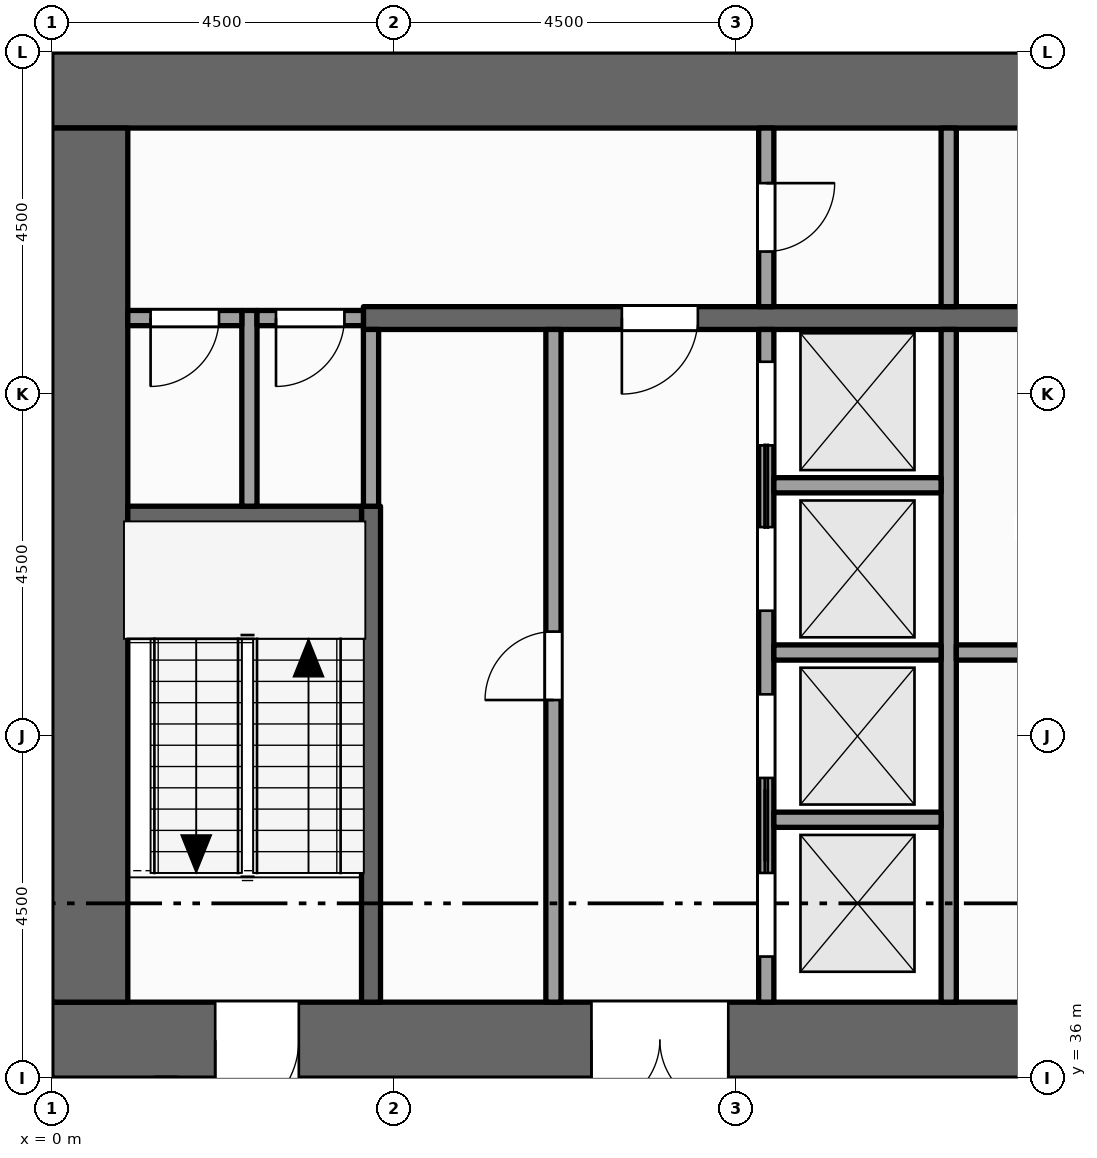
"""IFC4 building model, lengths in metres.
Left out: names, types, materials, properties, quantities, classifications, styles, units other than length and angle.
Written with IfcOpenShell. Run it as: python <this file> out.ifc"""

import sys

from ifc_helpers import new_model, si_unit, direction, frame, frame_2d, origin, place, context, subcontext, project, spatial, rectangle, extrude, element, fill, save


model = new_model("IFC4")
c1 = context("Model", 3, precision=1e-05, world=origin(), true_north=direction((0.0, 1.0)))
c2 = subcontext(c1, "Body", "Model", "MODEL_VIEW")
j1 = project(units=[si_unit("LENGTHUNIT", "METRE"), si_unit("PLANEANGLEUNIT", "RADIAN")], contexts=[c1])
p1 = place(None, origin())
s1 = spatial("IfcSite", under=j1, at=p1, CompositionType="ELEMENT")
p2 = place(p1, origin())
s2 = spatial("IfcBuilding", under=s1, at=p2, CompositionType="ELEMENT")
p3 = place(p2, frame((0.0, 0.0, 223.0)))
s3 = spatial("IfcBuildingStorey", under=s2, at=p3, CompositionType="ELEMENT", Elevation=223.0)
p4 = place(p3, frame((0.0, 36.5, -0.15), z_axis=(0.0, 0.0, 1.0), x_axis=(1.0, 0.0, 0.0)))
e1 = element("IfcWall", 1, at=p4, inside=s3, PredefinedType="SHEAR", context=c2, shape_type="SweptSolid", body=[
    extrude(rectangle(XDim=22.5, YDim=1.0, at=frame_2d((11.25, 0.0))), origin(), (0.0, 0.0, 1.0), 4.0),
])
p5 = place(p4, frame((7.1, 0.0, 0.15)))
e2 = element("IfcOpeningElement", 2, at=p5, cuts=e1, PredefinedType="OPENING", context=c2, shape_type="SweptSolid", body=[
    extrude(rectangle(XDim=1.8, YDim=2.1, at=frame_2d((0.9, 1.05))), frame((0.0, 0.51, 0.0), z_axis=(0.0, -1.0, 0.0), x_axis=(1.0, 0.0, 0.0)), (0.0, 0.0, 1.0), 1.02),
])
p6 = place(p4, frame((13.15, 0.0, 0.15)))
e3 = element("IfcOpeningElement", 3, at=p6, cuts=e1, PredefinedType="OPENING", context=c2, shape_type="SweptSolid", body=[
    extrude(rectangle(XDim=1.1, YDim=2.1, at=frame_2d((0.55, 1.05))), frame((0.0, 0.51, 0.0), z_axis=(0.0, -1.0, 0.0), x_axis=(1.0, 0.0, 0.0)), (0.0, 0.0, 1.0), 1.02),
])
p7 = place(p4, frame((2.15, 0.0, 0.15)))
e4 = element("IfcOpeningElement", 4, at=p7, cuts=e1, PredefinedType="OPENING", context=c2, shape_type="SweptSolid", body=[
    extrude(rectangle(XDim=1.1, YDim=2.1, at=frame_2d((0.55, 1.05))), frame((0.0, 0.51, 0.0), z_axis=(0.0, -1.0, 0.0), x_axis=(1.0, 0.0, 0.0)), (0.0, 0.0, 1.0), 1.02),
])
p8 = place(p4, frame((19.35, 0.0, 0.15)))
e5 = element("IfcOpeningElement", 5, at=p8, cuts=e1, PredefinedType="OPENING", context=c2, shape_type="SweptSolid", body=[
    extrude(rectangle(XDim=1.1, YDim=2.1, at=frame_2d((0.55, 1.05))), frame((0.0, 0.51, 0.0), z_axis=(0.0, -1.0, 0.0), x_axis=(1.0, 0.0, 0.0)), (0.0, 0.0, 1.0), 1.02),
])
p9 = place(p3, frame((0.0, 49.0, -0.15), z_axis=(0.0, 0.0, 1.0), x_axis=(1.0, 0.0, 0.0)))
e6 = element("IfcWall", 6, at=p9, inside=s3, PredefinedType="SHEAR", context=c2, shape_type="SweptSolid", body=[
    extrude(rectangle(XDim=22.5, YDim=1.0, at=frame_2d((11.25, 0.0))), origin(), (0.0, 0.0, 1.0), 4.0),
])
p10 = place(p3, frame((0.5, 37.0, -0.15), z_axis=(0.0, 0.0, 1.0), x_axis=(0.0, 1.0, 0.0)))
e7 = element("IfcWall", 7, at=p10, inside=s3, PredefinedType="SHEAR", context=c2, shape_type="SweptSolid", body=[
    extrude(rectangle(XDim=11.5, YDim=1.0, at=frame_2d((5.75, 0.0))), origin(), (0.0, 0.0, 1.0), 4.0),
])
p11 = place(p3, frame((2.6, 43.525, 0.0), z_axis=(0.0, 0.0, 1.0), x_axis=(0.0, 1.0, 0.0)))
e8 = element("IfcWall", 8, at=p11, inside=s3, PredefinedType="PARTITIONING", context=c2, shape_type="SweptSolid", body=[
    extrude(rectangle(XDim=2.575, YDim=0.2, at=frame_2d((1.288, 0.0))), origin(), (0.0, 0.0, 1.0), 3.85),
])
p12 = place(p3, frame((4.2, 37.0, 0.0), z_axis=(0.0, 0.0, 1.0), x_axis=(0.0, 1.0, 0.0)))
e9 = element("IfcWall", 9, at=p12, inside=s3, PredefinedType="SHEAR", context=c2, shape_type="SweptSolid", body=[
    extrude(rectangle(XDim=6.525, YDim=0.25, at=frame_2d((3.262, 0.0))), origin(), (0.0, 0.0, 1.0), 3.85),
])
p13 = place(p3, frame((4.2, 43.525, 0.0), z_axis=(0.0, 0.0, 1.0), x_axis=(0.0, 1.0, 0.0)))
e10 = element("IfcWall", 10, at=p13, inside=s3, PredefinedType="PARTITIONING", context=c2, shape_type="SweptSolid", body=[
    extrude(rectangle(XDim=2.325, YDim=0.2, at=frame_2d((1.163, 0.0))), origin(), (0.0, 0.0, 1.0), 3.85),
])
p14 = place(p3, frame((6.6, 37.0, 0.0), z_axis=(0.0, 0.0, 1.0), x_axis=(0.0, 1.0, 0.0)))
e11 = element("IfcWall", 11, at=p14, inside=s3, PredefinedType="PARTITIONING", context=c2, shape_type="SweptSolid", body=[
    extrude(rectangle(XDim=8.85, YDim=0.2, at=frame_2d((4.425, 0.0))), origin(), (0.0, 0.0, 1.0), 3.85),
])
p15 = place(p14, frame((3.975, 0.0, 0.0)))
e12 = element("IfcOpeningElement", 12, at=p15, cuts=e11, PredefinedType="OPENING", context=c2, shape_type="SweptSolid", body=[
    extrude(rectangle(XDim=0.9, YDim=2.1, at=frame_2d((0.45, 1.05))), frame((0.0, 0.11, 0.0), z_axis=(0.0, -1.0, 0.0), x_axis=(1.0, 0.0, 0.0)), (0.0, 0.0, 1.0), 0.22),
])
p16 = place(p3, frame((9.4, 37.0, 0.0), z_axis=(0.0, 0.0, 1.0), x_axis=(0.0, 1.0, 0.0)))
e13 = element("IfcWall", 13, at=p16, inside=s3, PredefinedType="SOLIDWALL", context=c2, shape_type="SweptSolid", body=[
    extrude(rectangle(XDim=8.85, YDim=0.2, at=frame_2d((4.425, 0.0))), origin(), (0.0, 0.0, 1.0), 3.85),
])
p17 = place(p16, frame((0.6, 0.0, 0.012)))
e14 = element("IfcOpeningElement", 14, at=p17, cuts=e13, PredefinedType="OPENING", context=c2, shape_type="SweptSolid", body=[
    extrude(rectangle(XDim=1.1, YDim=2.1, at=frame_2d((0.55, 1.05))), frame((0.0, 0.11, 0.0), z_axis=(0.0, -1.0, 0.0), x_axis=(1.0, 0.0, 0.0)), (0.0, 0.0, 1.0), 0.22),
])
p18 = place(p16, frame((2.95, 0.0, 0.012)))
e15 = element("IfcOpeningElement", 15, at=p18, cuts=e13, PredefinedType="OPENING", context=c2, shape_type="SweptSolid", body=[
    extrude(rectangle(XDim=1.1, YDim=2.1, at=frame_2d((0.55, 1.05))), frame((0.0, 0.11, 0.0), z_axis=(0.0, -1.0, 0.0), x_axis=(1.0, 0.0, 0.0)), (0.0, 0.0, 1.0), 0.22),
])
p19 = place(p16, frame((5.15, 0.0, 0.012)))
e16 = element("IfcOpeningElement", 16, at=p19, cuts=e13, PredefinedType="OPENING", context=c2, shape_type="SweptSolid", body=[
    extrude(rectangle(XDim=1.1, YDim=2.1, at=frame_2d((0.55, 1.05))), frame((0.0, 0.11, 0.0), z_axis=(0.0, -1.0, 0.0), x_axis=(1.0, 0.0, 0.0)), (0.0, 0.0, 1.0), 0.22),
])
p20 = place(p16, frame((7.325, 0.0, 0.012)))
e17 = element("IfcOpeningElement", 17, at=p20, cuts=e13, PredefinedType="OPENING", context=c2, shape_type="SweptSolid", body=[
    extrude(rectangle(XDim=1.1, YDim=2.1, at=frame_2d((0.55, 1.05))), frame((0.0, 0.11, 0.0), z_axis=(0.0, -1.0, 0.0), x_axis=(1.0, 0.0, 0.0)), (0.0, 0.0, 1.0), 0.22),
])
p21 = place(p3, frame((9.4, 46.15, 0.0), z_axis=(0.0, 0.0, 1.0), x_axis=(0.0, 1.0, 0.0)))
e18 = element("IfcWall", 18, at=p21, inside=s3, PredefinedType="PARTITIONING", context=c2, shape_type="SweptSolid", body=[
    extrude(rectangle(XDim=2.35, YDim=0.2, at=frame_2d((1.175, 0.0))), origin(), (0.0, 0.0, 1.0), 3.85),
])
p22 = place(p21, frame((0.725, 0.0, 0.0)))
e19 = element("IfcOpeningElement", 19, at=p22, cuts=e18, PredefinedType="OPENING", context=c2, shape_type="SweptSolid", body=[
    extrude(rectangle(XDim=0.9, YDim=2.1, at=frame_2d((0.45, 1.05))), frame((0.0, 0.11, 0.0), z_axis=(0.0, -1.0, 0.0), x_axis=(1.0, 0.0, 0.0)), (0.0, 0.0, 1.0), 0.22),
])
p23 = place(p3, frame((11.8, 37.0, 0.0), z_axis=(0.0, 0.0, 1.0), x_axis=(0.0, 1.0, 0.0)))
e20 = element("IfcWall", 20, at=p23, inside=s3, PredefinedType="SOLIDWALL", context=c2, shape_type="SweptSolid", body=[
    extrude(rectangle(XDim=8.85, YDim=0.2, at=frame_2d((4.425, 0.0))), origin(), (0.0, 0.0, 1.0), 3.85),
])
p24 = place(p3, frame((11.8, 46.15, 0.0), z_axis=(0.0, 0.0, 1.0), x_axis=(0.0, 1.0, 0.0)))
e21 = element("IfcWall", 21, at=p24, inside=s3, PredefinedType="PARTITIONING", context=c2, shape_type="SweptSolid", body=[
    extrude(rectangle(XDim=2.35, YDim=0.2, at=frame_2d((1.175, 0.0))), origin(), (0.0, 0.0, 1.0), 3.85),
])
for number, where, z_axis, x_axis in (
    (22, (9.5, 39.4, 0.0), (0.0, 0.0, 1.0), (1.0, 0.0, 0.0)),
    (23, (9.5, 41.6, 0.0), (0.0, 0.0, 1.0), (1.0, 0.0, 0.0)),
):
    element("IfcWall", number, at=place(p3, frame(where, z_axis=z_axis, x_axis=x_axis)), inside=s3, PredefinedType="SOLIDWALL", context=c2, shape_type="SweptSolid", body=[
        extrude(rectangle(XDim=2.2, YDim=0.2, at=frame_2d((1.1, 0.0))), origin(), (0.0, 0.0, 1.0), 3.85),
    ])
p25 = place(p3, frame((11.9, 41.6, 0.0), z_axis=(0.0, 0.0, 1.0), x_axis=(1.0, 0.0, 0.0)))
e24 = element("IfcWall", 24, at=p25, inside=s3, PredefinedType="PARTITIONING", context=c2, shape_type="SweptSolid", body=[
    extrude(rectangle(XDim=3.6, YDim=0.2, at=frame_2d((1.8, 0.0))), origin(), (0.0, 0.0, 1.0), 3.85),
])
p26 = place(p25, frame((1.3, 0.0, 0.0)))
e25 = element("IfcOpeningElement", 25, at=p26, cuts=e24, PredefinedType="OPENING", context=c2, shape_type="SweptSolid", body=[
    extrude(rectangle(XDim=1.0, YDim=2.1, at=frame_2d((0.5, 1.05))), frame((0.0, 0.11, 0.0), z_axis=(0.0, -1.0, 0.0), x_axis=(1.0, 0.0, 0.0)), (0.0, 0.0, 1.0), 0.22),
])
p27 = place(p3, frame((1.0, 43.4, 0.0), z_axis=(0.0, 0.0, 1.0), x_axis=(1.0, 0.0, 0.0)))
e26 = element("IfcWall", 26, at=p27, inside=s3, PredefinedType="SHEAR", context=c2, shape_type="SweptSolid", body=[
    extrude(rectangle(XDim=3.075, YDim=0.25, at=frame_2d((1.538, 0.0))), origin(), (0.0, 0.0, 1.0), 3.85),
])
p28 = place(p3, frame((9.5, 43.8, 0.0), z_axis=(0.0, 0.0, 1.0), x_axis=(1.0, 0.0, 0.0)))
e27 = element("IfcWall", 27, at=p28, inside=s3, PredefinedType="SOLIDWALL", context=c2, shape_type="SweptSolid", body=[
    extrude(rectangle(XDim=2.2, YDim=0.2, at=frame_2d((1.1, 0.0))), origin(), (0.0, 0.0, 1.0), 3.85),
])
p29 = place(p3, frame((1.0, 46.0, 0.0), z_axis=(0.0, 0.0, 1.0), x_axis=(1.0, 0.0, 0.0)))
e28 = element("IfcWall", 28, at=p29, inside=s3, PredefinedType="PARTITIONING", context=c2, shape_type="SweptSolid", body=[
    extrude(rectangle(XDim=1.5, YDim=0.2, at=frame_2d((0.75, 0.0))), origin(), (0.0, 0.0, 1.0), 3.85),
])
p30 = place(p29, frame((0.3, 0.0, 0.0)))
e29 = element("IfcOpeningElement", 29, at=p30, cuts=e28, PredefinedType="OPENING", context=c2, shape_type="SweptSolid", body=[
    extrude(rectangle(XDim=0.9, YDim=2.1, at=frame_2d((0.45, 1.05))), frame((0.0, 0.11, 0.0), z_axis=(0.0, -1.0, 0.0), x_axis=(1.0, 0.0, 0.0)), (0.0, 0.0, 1.0), 0.22),
])
p31 = place(p3, frame((2.7, 46.0, 0.0), z_axis=(0.0, 0.0, 1.0), x_axis=(1.0, 0.0, 0.0)))
e30 = element("IfcWall", 30, at=p31, inside=s3, PredefinedType="PARTITIONING", context=c2, shape_type="SweptSolid", body=[
    extrude(rectangle(XDim=1.4, YDim=0.2, at=frame_2d((0.7, 0.0))), origin(), (0.0, 0.0, 1.0), 3.85),
])
p32 = place(p31, frame((0.25, 0.0, 0.0)))
e31 = element("IfcOpeningElement", 31, at=p32, cuts=e30, PredefinedType="OPENING", context=c2, shape_type="SweptSolid", body=[
    extrude(rectangle(XDim=0.9, YDim=2.1, at=frame_2d((0.45, 1.05))), frame((0.0, 0.11, 0.0), z_axis=(0.0, -1.0, 0.0), x_axis=(1.0, 0.0, 0.0)), (0.0, 0.0, 1.0), 0.22),
])
p33 = place(p3, frame((4.1, 46.0, 0.0), z_axis=(0.0, 0.0, 1.0), x_axis=(1.0, 0.0, 0.0)))
e32 = element("IfcWall", 32, at=p33, inside=s3, PredefinedType="SHEAR", context=c2, shape_type="SweptSolid", body=[
    extrude(rectangle(XDim=14.5, YDim=0.3, at=frame_2d((7.25, 0.0))), origin(), (0.0, 0.0, 1.0), 3.85),
])
p34 = place(p33, frame((3.4, 0.0, 0.0)))
e33 = element("IfcOpeningElement", 33, at=p34, cuts=e32, PredefinedType="OPENING", context=c2, shape_type="SweptSolid", body=[
    extrude(rectangle(XDim=1.0, YDim=2.1, at=frame_2d((0.5, 1.05))), frame((0.0, 0.16, 0.0), z_axis=(0.0, -1.0, 0.0), x_axis=(1.0, 0.0, 0.0)), (0.0, 0.0, 1.0), 0.32),
])
p35 = place(p33, frame((9.1, 0.0, 0.0)))
e34 = element("IfcOpeningElement", 34, at=p35, cuts=e32, PredefinedType="OPENING", context=c2, shape_type="SweptSolid", body=[
    extrude(rectangle(XDim=1.0, YDim=2.1, at=frame_2d((0.5, 1.05))), frame((0.0, 0.16, 0.0), z_axis=(0.0, -1.0, 0.0), x_axis=(1.0, 0.0, 0.0)), (0.0, 0.0, 1.0), 0.32),
])
p36 = place(p17, origin())
e35 = element("IfcDoor", 35, at=p36, inside=s3, OperationType="SLIDING_TO_RIGHT", PredefinedType="DOOR", context=c2, shape_type="SweptSolid", body=[
    extrude(rectangle(XDim=1.1, YDim=2.1, at=frame_2d((0.55, 1.05))), frame((0.0, 0.025, 0.0), z_axis=(0.0, -1.0, 0.0), x_axis=(1.0, 0.0, 0.0)), (0.0, 0.0, 1.0), 0.05),
])
fill(e14, e35)
p37 = place(p18, origin())
e36 = element("IfcDoor", 36, at=p37, inside=s3, OperationType="SLIDING_TO_LEFT", PredefinedType="DOOR", context=c2, shape_type="SweptSolid", body=[
    extrude(rectangle(XDim=1.1, YDim=2.1, at=frame_2d((0.55, 1.05))), frame((0.0, 0.025, 0.0), z_axis=(0.0, -1.0, 0.0), x_axis=(1.0, 0.0, 0.0)), (0.0, 0.0, 1.0), 0.05),
])
fill(e15, e36)
p38 = place(p19, origin())
e37 = element("IfcDoor", 37, at=p38, inside=s3, OperationType="SLIDING_TO_RIGHT", PredefinedType="DOOR", context=c2, shape_type="SweptSolid", body=[
    extrude(rectangle(XDim=1.1, YDim=2.1, at=frame_2d((0.55, 1.05))), frame((0.0, 0.025, 0.0), z_axis=(0.0, -1.0, 0.0), x_axis=(1.0, 0.0, 0.0)), (0.0, 0.0, 1.0), 0.05),
])
fill(e16, e37)
p39 = place(p20, origin())
e38 = element("IfcDoor", 38, at=p39, inside=s3, OperationType="SLIDING_TO_LEFT", PredefinedType="DOOR", context=c2, shape_type="SweptSolid", body=[
    extrude(rectangle(XDim=1.1, YDim=2.1, at=frame_2d((0.55, 1.05))), frame((0.0, 0.025, 0.0), z_axis=(0.0, -1.0, 0.0), x_axis=(1.0, 0.0, 0.0)), (0.0, 0.0, 1.0), 0.05),
])
fill(e17, e38)
p40 = place(p5, origin())
e39 = element("IfcDoor", 39, at=p40, inside=s3, OperationType="DOUBLE_DOOR_SINGLE_SWING", PredefinedType="DOOR", context=c2, shape_type="SweptSolid", body=[
    extrude(rectangle(XDim=1.8, YDim=2.1, at=frame_2d((0.9, 1.05))), frame((0.0, 0.025, 0.0), z_axis=(0.0, -1.0, 0.0), x_axis=(1.0, 0.0, 0.0)), (0.0, 0.0, 1.0), 0.05),
])
fill(e2, e39)
p41 = place(p34, origin())
e40 = element("IfcDoor", 40, at=p41, inside=s3, OperationType="SINGLE_SWING_LEFT", PredefinedType="DOOR", context=c2, shape_type="SweptSolid", body=[
    extrude(rectangle(XDim=1.0, YDim=2.1, at=frame_2d((0.5, 1.05))), frame((0.0, 0.025, 0.0), z_axis=(0.0, -1.0, 0.0), x_axis=(1.0, 0.0, 0.0)), (0.0, 0.0, 1.0), 0.05),
])
fill(e33, e40)
p42 = place(p22, origin())
e41 = element("IfcDoor", 41, at=p42, inside=s3, OperationType="SINGLE_SWING_RIGHT", PredefinedType="DOOR", context=c2, shape_type="SweptSolid", body=[
    extrude(rectangle(XDim=0.9, YDim=2.1, at=frame_2d((0.45, 1.05))), frame((0.0, 0.025, 0.0), z_axis=(0.0, -1.0, 0.0), x_axis=(1.0, 0.0, 0.0)), (0.0, 0.0, 1.0), 0.05),
])
fill(e19, e41)
p43 = place(p7, origin())
e42 = element("IfcDoor", 42, at=p43, inside=s3, OperationType="SINGLE_SWING_LEFT", PredefinedType="DOOR", context=c2, shape_type="SweptSolid", body=[
    extrude(rectangle(XDim=1.1, YDim=2.1, at=frame_2d((0.55, 1.05))), frame((0.0, 0.025, 0.0), z_axis=(0.0, -1.0, 0.0), x_axis=(1.0, 0.0, 0.0)), (0.0, 0.0, 1.0), 0.05),
])
fill(e4, e42)
p44 = place(p30, origin())
e43 = element("IfcDoor", 43, at=p44, inside=s3, OperationType="SINGLE_SWING_LEFT", PredefinedType="DOOR", context=c2, shape_type="SweptSolid", body=[
    extrude(rectangle(XDim=0.9, YDim=2.1, at=frame_2d((0.45, 1.05))), frame((0.0, 0.025, 0.0), z_axis=(0.0, -1.0, 0.0), x_axis=(1.0, 0.0, 0.0)), (0.0, 0.0, 1.0), 0.05),
])
fill(e29, e43)
p45 = place(p32, origin())
e44 = element("IfcDoor", 44, at=p45, inside=s3, OperationType="SINGLE_SWING_LEFT", PredefinedType="DOOR", context=c2, shape_type="SweptSolid", body=[
    extrude(rectangle(XDim=0.9, YDim=2.1, at=frame_2d((0.45, 1.05))), frame((0.0, 0.025, 0.0), z_axis=(0.0, -1.0, 0.0), x_axis=(1.0, 0.0, 0.0)), (0.0, 0.0, 1.0), 0.05),
])
fill(e31, e44)
p46 = place(p15, origin())
e45 = element("IfcDoor", 45, at=p46, inside=s3, OperationType="SINGLE_SWING_LEFT", PredefinedType="DOOR", context=c2, shape_type="SweptSolid", body=[
    extrude(rectangle(XDim=0.9, YDim=2.1, at=frame_2d((0.45, 1.05))), frame((0.0, 0.025, 0.0), z_axis=(0.0, -1.0, 0.0), x_axis=(1.0, 0.0, 0.0)), (0.0, 0.0, 1.0), 0.05),
])
fill(e12, e45)
save(model, sys.argv[1])
